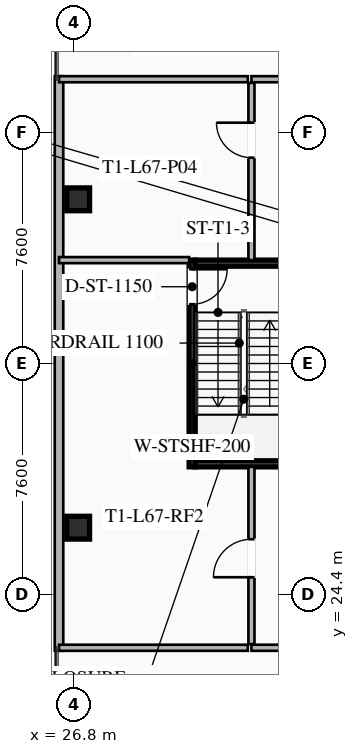
"""IFC4 building model, lengths in metres.
Left out: names, types, materials, properties, quantities, classifications, styles, units other than length and angle.
Written with IfcOpenShell. Run it as: python <this file> out.ifc"""

import sys

from ifc_helpers import new_model, si_unit, direction, frame, frame_2d, origin, origin_2d, place, context, subcontext, project, spatial, rectangle, hollow_rectangle, extrude, element, fill, save


model = new_model("IFC4")
c1 = context("Model", 3, precision=1e-05, world=origin(), true_north=direction((0.0, 1.0)))
c2 = subcontext(c1, "Body", "Model", "MODEL_VIEW")
j1 = project(units=[si_unit("LENGTHUNIT", "METRE"), si_unit("PLANEANGLEUNIT", "RADIAN")], contexts=[c1])
p1 = place(None, origin())
s1 = spatial("IfcSite", under=j1, at=p1, CompositionType="ELEMENT")
p2 = place(p1, origin())
s2 = spatial("IfcBuilding", under=s1, at=p2, CompositionType="ELEMENT")
p3 = place(p2, frame((0.0, 0.0, 246.8)))
s3 = spatial("IfcBuildingStorey", under=s2, at=p3, CompositionType="ELEMENT", Elevation=246.8)
for number, where, z_axis, x_axis in (
    (1, (26.95, 37.4, 0.0), (0.0, 0.0, 1.0), (1.0, 0.0, 0.0)),
    (2, (26.95, 26.6, 0.0), (0.0, 0.0, 1.0), (1.0, 0.0, 0.0)),
):
    element("IfcColumn", number, at=place(p3, frame(where, z_axis=z_axis, x_axis=x_axis)), inside=s3, PredefinedType="COLUMN", context=c2, shape_type="SweptSolid", body=[
        extrude(hollow_rectangle(XDim=0.75, YDim=0.75, WallThickness=0.032, at=origin_2d()), origin(), (0.0, 0.0, 1.0), 4.38),
    ])
p4 = place(p3, frame((26.32, 22.55, 0.0), z_axis=(0.0, 0.0, 1.0), x_axis=(0.0, 1.0, 0.0)))
e3 = element("IfcWall", 3, at=p4, inside=s3, PredefinedType="SOLIDWALL", context=c2, shape_type="SweptSolid", body=[
    extrude(rectangle(XDim=18.9, YDim=0.28, at=frame_2d((9.45, 0.0))), origin(), (0.0, 0.0, 1.0), 4.38),
])
p5 = place(p3, frame((30.7, 35.4, 0.0), z_axis=(0.0, 0.0, 1.0), x_axis=(0.0, -1.0, 0.0)))
e4 = element("IfcWall", 4, at=p5, inside=s3, PredefinedType="SHEAR", context=c2, shape_type="SweptSolid", body=[
    extrude(rectangle(XDim=6.8, YDim=0.2, at=frame_2d((3.4, 0.0))), origin(), (0.0, 0.0, 1.0), 4.38),
])
p6 = place(p5, frame((0.3, 0.0, 0.0)))
e5 = element("IfcOpeningElement", 5, at=p6, cuts=e4, PredefinedType="OPENING", context=c2, shape_type="SweptSolid", body=[
    extrude(rectangle(XDim=1.15, YDim=2.2, at=frame_2d((0.575, 1.1))), frame((0.0, 0.11, 0.0), z_axis=(0.0, -1.0, 0.0), x_axis=(1.0, 0.0, 0.0)), (0.0, 0.0, 1.0), 0.22),
])
for number, where, z_axis, x_axis in (
    (6, (34.2, 35.3, 0.0), (0.0, 0.0, 1.0), (-1.0, 0.0, 0.0)),
    (7, (30.8, 28.7, 0.0), (0.0, 0.0, 1.0), (1.0, 0.0, 0.0)),
):
    element("IfcWall", number, at=place(p3, frame(where, z_axis=z_axis, x_axis=x_axis)), inside=s3, PredefinedType="SHEAR", context=c2, shape_type="SweptSolid", body=[
        extrude(rectangle(XDim=3.4, YDim=0.2, at=frame_2d((1.7, 0.0))), origin(), (0.0, 0.0, 1.0), 4.38),
    ])
for number, where, z_axis, x_axis in (
    (8, (32.65, 41.35, 0.0), (0.0, 0.0, 1.0), (1.0, 0.0, 0.0)),
    (9, (51.35, 22.65, 0.0), (0.0, 0.0, 1.0), (-1.0, 0.0, 0.0)),
):
    element("IfcWall", number, at=place(p3, frame(where, z_axis=z_axis, x_axis=x_axis)), inside=s3, PredefinedType="SOLIDWALL", context=c2, shape_type="SweptSolid", body=[
        extrude(rectangle(XDim=18.7, YDim=0.2, at=frame_2d((9.35, 0.0))), origin(), (0.0, 0.0, 1.0), 3.491),
    ])
p7 = place(p3, frame((32.65, 22.77, 0.0), z_axis=(0.0, 0.0, 1.0), x_axis=(0.0, 1.0, 0.0)))
e10 = element("IfcWall", 10, at=p7, inside=s3, PredefinedType="SOLIDWALL", context=c2, shape_type="SweptSolid", body=[
    extrude(rectangle(XDim=5.83, YDim=0.2, at=frame_2d((2.915, 0.0))), origin(), (0.0, 0.0, 1.0), 3.491),
])
p8 = place(p7, frame((2.2, 0.0, 0.0)))
e11 = element("IfcOpeningElement", 11, at=p8, cuts=e10, PredefinedType="OPENING", context=c2, shape_type="SweptSolid", body=[
    extrude(rectangle(XDim=1.25, YDim=2.25, at=frame_2d((0.625, 1.125))), frame((0.0, 0.11, 0.0), z_axis=(0.0, -1.0, 0.0), x_axis=(1.0, 0.0, 0.0)), (0.0, 0.0, 1.0), 0.22),
])
p9 = place(p3, frame((32.65, 35.4, 0.0), z_axis=(0.0, 0.0, 1.0), x_axis=(0.0, 1.0, 0.0)))
e12 = element("IfcWall", 12, at=p9, inside=s3, PredefinedType="SOLIDWALL", context=c2, shape_type="SweptSolid", body=[
    extrude(rectangle(XDim=5.83, YDim=0.2, at=frame_2d((2.915, 0.0))), origin(), (0.0, 0.0, 1.0), 3.491),
])
p10 = place(p9, frame((3.37, 0.0, 0.0)))
e13 = element("IfcOpeningElement", 13, at=p10, cuts=e12, PredefinedType="OPENING", context=c2, shape_type="SweptSolid", body=[
    extrude(rectangle(XDim=1.15, YDim=2.2, at=frame_2d((0.575, 1.1))), frame((0.0, 0.11, 0.0), z_axis=(0.0, -1.0, 0.0), x_axis=(1.0, 0.0, 0.0)), (0.0, 0.0, 1.0), 0.22),
])
for number, where, z_axis, x_axis in (
    (14, (26.32, 41.35, 0.0), (0.0, 0.0, 1.0), (1.0, 0.0, 0.0)),
    (15, (26.32, 22.65, 0.0), (0.0, 0.0, 1.0), (1.0, 0.0, 0.0)),
):
    element("IfcWall", number, at=place(p3, frame(where, z_axis=z_axis, x_axis=x_axis)), inside=s3, PredefinedType="SOLIDWALL", context=c2, shape_type="SweptSolid", body=[
        extrude(rectangle(XDim=6.21, YDim=0.2, at=frame_2d((3.105, 0.0))), origin(), (0.0, 0.0, 1.0), 3.491),
    ])
p11 = place(p3, frame((26.32, 35.4, 0.0), z_axis=(0.0, 0.0, 1.0), x_axis=(1.0, 0.0, 0.0)))
e16 = element("IfcWall", 16, at=p11, inside=s3, PredefinedType="SOLIDWALL", context=c2, shape_type="SweptSolid", body=[
    extrude(rectangle(XDim=4.28, YDim=0.2, at=frame_2d((2.14, 0.0))), origin(), (0.0, 0.0, 1.0), 3.491),
])
p12 = place(p6, origin())
e17 = element("IfcDoor", 17, at=p12, inside=s3, OperationType="SINGLE_SWING_LEFT", PredefinedType="DOOR", context=c2, shape_type="SweptSolid", body=[
    extrude(rectangle(XDim=1.15, YDim=2.2, at=frame_2d((0.575, 1.1))), frame((0.0, 0.025, 0.0), z_axis=(0.0, -1.0, 0.0), x_axis=(1.0, 0.0, 0.0)), (0.0, 0.0, 1.0), 0.05),
])
fill(e5, e17)
p13 = place(p8, origin())
e18 = element("IfcDoor", 18, at=p13, inside=s3, OperationType="SINGLE_SWING_LEFT", PredefinedType="DOOR", context=c2, shape_type="SweptSolid", body=[
    extrude(rectangle(XDim=1.25, YDim=2.25, at=frame_2d((0.625, 1.125))), frame((0.0, 0.025, 0.0), z_axis=(0.0, -1.0, 0.0), x_axis=(1.0, 0.0, 0.0)), (0.0, 0.0, 1.0), 0.05),
])
fill(e11, e18)
p14 = place(p10, origin())
e19 = element("IfcDoor", 19, at=p14, inside=s3, OperationType="SINGLE_SWING_RIGHT", PredefinedType="DOOR", context=c2, shape_type="SweptSolid", body=[
    extrude(rectangle(XDim=1.15, YDim=2.2, at=frame_2d((0.575, 1.1))), frame((0.0, 0.025, 0.0), z_axis=(0.0, -1.0, 0.0), x_axis=(1.0, 0.0, 0.0)), (0.0, 0.0, 1.0), 0.05),
])
fill(e13, e19)
save(model, sys.argv[1])
